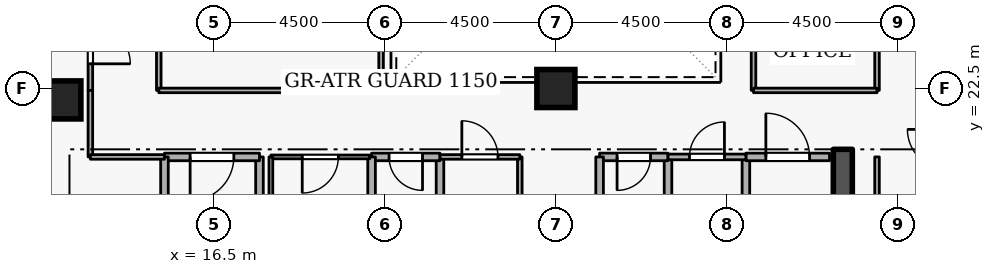
"""IFC4 building model, lengths in metres.
Left out: names, types, materials, properties, quantities, classifications, styles, units other than length and angle.
Written with IfcOpenShell. Run it as: python <this file> out.ifc"""

import sys

from ifc_helpers import new_model, si_unit, direction, frame, frame_2d, origin, origin_2d, place, context, subcontext, project, spatial, rectangle, extrude, element, fill, save


model = new_model("IFC4")
c1 = context("Model", 3, precision=1e-05, world=origin(), true_north=direction((0.0, 1.0)))
c2 = subcontext(c1, "Body", "Model", "MODEL_VIEW")
j1 = project(units=[si_unit("LENGTHUNIT", "METRE"), si_unit("PLANEANGLEUNIT", "RADIAN")], contexts=[c1])
p1 = place(None, origin())
s1 = spatial("IfcSite", under=j1, at=p1, CompositionType="ELEMENT")
p2 = place(p1, origin())
s2 = spatial("IfcBuilding", under=s1, at=p2, CompositionType="ELEMENT")
p3 = place(p2, frame((0.0, 0.0, 203.7)))
s3 = spatial("IfcBuildingStorey", under=s2, at=p3, CompositionType="ELEMENT", Elevation=203.7)
p4 = place(p3, frame((33.05, 15.1, 0.0), z_axis=(0.0, 0.0, 1.0), x_axis=(0.0, 1.0, 0.0)))
e1 = element("IfcWall", 1, at=p4, inside=s3, PredefinedType="SHEAR", context=c2, shape_type="SweptSolid", body=[
    extrude(rectangle(XDim=5.8, YDim=0.5, at=frame_2d((2.9, 0.0))), origin(), (0.0, 0.0, 1.0), 3.6),
])
for number, where, z_axis, x_axis in (
    (2, (12.5, 22.2, 0.0), (0.0, 0.0, 1.0), (1.0, 0.0, 0.0)),
    (3, (25.5, 22.5, 0.0), (0.0, 0.0, 1.0), (1.0, 0.0, 0.0)),
):
    element("IfcColumn", number, at=place(p3, frame(where, z_axis=z_axis, x_axis=x_axis)), inside=s3, PredefinedType="COLUMN", context=c2, shape_type="SweptSolid", body=[
        extrude(rectangle(XDim=1.0, YDim=1.0, at=origin_2d()), origin(), (0.0, 0.0, 1.0), 3.6),
    ])
p5 = place(p3, frame((17.7, 18.4, 0.0), z_axis=(0.0, 0.0, 1.0), x_axis=(0.0, 1.0, 0.0)))
e4 = element("IfcWall", 4, at=p5, inside=s3, PredefinedType="STANDARD", context=c2, shape_type="SweptSolid", body=[
    extrude(rectangle(XDim=2.3, YDim=0.2, at=frame_2d((1.15, 0.0))), origin(), (0.0, 0.0, 1.0), 2.545),
])
p6 = place(p3, frame((17.7, 20.7, 0.0), z_axis=(0.0, 0.0, 1.0), x_axis=(-1.0, 0.0, 0.0)))
e5 = element("IfcWall", 5, at=p6, inside=s3, PredefinedType="STANDARD", context=c2, shape_type="SweptSolid", body=[
    extrude(rectangle(XDim=2.5, YDim=0.2, at=frame_2d((1.25, 0.0))), origin(), (0.0, 0.0, 1.0), 3.34),
])
p7 = place(p6, frame((0.675, 0.0, 0.0)))
e6 = element("IfcOpeningElement", 6, at=p7, cuts=e5, PredefinedType="OPENING", context=c2, shape_type="SweptSolid", body=[
    extrude(rectangle(XDim=1.15, YDim=2.1, at=frame_2d((0.575, 1.05))), frame((0.0, 0.11, 0.0), z_axis=(0.0, -1.0, 0.0), x_axis=(1.0, 0.0, 0.0)), (0.0, 0.0, 1.0), 0.22),
])
p8 = place(p3, frame((15.2, 20.7, 0.0), z_axis=(0.0, 0.0, 1.0), x_axis=(0.0, -1.0, 0.0)))
e7 = element("IfcWall", 7, at=p8, inside=s3, PredefinedType="STANDARD", context=c2, shape_type="SweptSolid", body=[
    extrude(rectangle(XDim=5.7, YDim=0.2, at=frame_2d((2.85, 0.0))), origin(), (0.0, 0.0, 1.0), 3.34),
])
p9 = place(p3, frame((28.45, 18.65, 0.0), z_axis=(0.0, 0.0, 1.0), x_axis=(0.0, 1.0, 0.0)))
e8 = element("IfcWall", 8, at=p9, inside=s3, PredefinedType="STANDARD", context=c2, shape_type="SweptSolid", body=[
    extrude(rectangle(XDim=2.05, YDim=0.2, at=frame_2d((1.025, 0.0))), origin(), (0.0, 0.0, 1.0), 3.34),
])
p10 = place(p3, frame((28.45, 20.7, 0.0), z_axis=(0.0, 0.0, 1.0), x_axis=(-1.0, 0.0, 0.0)))
e9 = element("IfcWall", 9, at=p10, inside=s3, PredefinedType="STANDARD", context=c2, shape_type="SweptSolid", body=[
    extrude(rectangle(XDim=1.8, YDim=0.2, at=frame_2d((0.9, 0.0))), origin(), (0.0, 0.0, 1.0), 3.34),
])
p11 = place(p10, frame((0.46, 0.0, 0.0)))
e10 = element("IfcOpeningElement", 10, at=p11, cuts=e9, PredefinedType="OPENING", context=c2, shape_type="SweptSolid", body=[
    extrude(rectangle(XDim=0.88, YDim=2.04, at=frame_2d((0.44, 1.02))), frame((0.0, 0.11, 0.0), z_axis=(0.0, -1.0, 0.0), x_axis=(1.0, 0.0, 0.0)), (0.0, 0.0, 1.0), 0.22),
])
for number, where, z_axis, x_axis in (
    (11, (26.65, 20.7, 0.0), (0.0, 0.0, 1.0), (0.0, -1.0, 0.0)),
    (12, (22.45, 18.65, 0.0), (0.0, 0.0, 1.0), (0.0, 1.0, 0.0)),
):
    element("IfcWall", number, at=place(p3, frame(where, z_axis=z_axis, x_axis=x_axis)), inside=s3, PredefinedType="STANDARD", context=c2, shape_type="SweptSolid", body=[
        extrude(rectangle(XDim=2.05, YDim=0.2, at=frame_2d((1.025, 0.0))), origin(), (0.0, 0.0, 1.0), 3.34),
    ])
p12 = place(p3, frame((22.45, 20.7, 0.0), z_axis=(0.0, 0.0, 1.0), x_axis=(-1.0, 0.0, 0.0)))
e13 = element("IfcWall", 13, at=p12, inside=s3, PredefinedType="STANDARD", context=c2, shape_type="SweptSolid", body=[
    extrude(rectangle(XDim=1.8, YDim=0.2, at=frame_2d((0.9, 0.0))), origin(), (0.0, 0.0, 1.0), 3.34),
])
p13 = place(p12, frame((0.46, 0.0, 0.0)))
e14 = element("IfcOpeningElement", 14, at=p13, cuts=e13, PredefinedType="OPENING", context=c2, shape_type="SweptSolid", body=[
    extrude(rectangle(XDim=0.88, YDim=2.04, at=frame_2d((0.44, 1.02))), frame((0.0, 0.11, 0.0), z_axis=(0.0, -1.0, 0.0), x_axis=(1.0, 0.0, 0.0)), (0.0, 0.0, 1.0), 0.22),
])
for number, where, z_axis, x_axis in (
    (15, (20.65, 20.7, 0.0), (0.0, 0.0, 1.0), (0.0, -1.0, 0.0)),
    (16, (30.5, 18.65, 0.0), (0.0, 0.0, 1.0), (0.0, 1.0, 0.0)),
):
    element("IfcWall", number, at=place(p3, frame(where, z_axis=z_axis, x_axis=x_axis)), inside=s3, PredefinedType="STANDARD", context=c2, shape_type="SweptSolid", body=[
        extrude(rectangle(XDim=2.05, YDim=0.2, at=frame_2d((1.025, 0.0))), origin(), (0.0, 0.0, 1.0), 3.34),
    ])
p14 = place(p3, frame((30.5, 20.7, 0.0), z_axis=(0.0, 0.0, 1.0), x_axis=(1.0, 0.0, 0.0)))
e17 = element("IfcWall", 17, at=p14, inside=s3, PredefinedType="STANDARD", context=c2, shape_type="SweptSolid", body=[
    extrude(rectangle(XDim=2.2, YDim=0.2, at=frame_2d((1.1, 0.0))), origin(), (0.0, 0.0, 1.0), 3.34),
])
p15 = place(p14, frame((0.525, 0.0, 0.0)))
e18 = element("IfcOpeningElement", 18, at=p15, cuts=e17, PredefinedType="OPENING", context=c2, shape_type="SweptSolid", body=[
    extrude(rectangle(XDim=1.15, YDim=2.1, at=frame_2d((0.575, 1.05))), frame((0.0, 0.11, 0.0), z_axis=(0.0, -1.0, 0.0), x_axis=(1.0, 0.0, 0.0)), (0.0, 0.0, 1.0), 0.22),
])
p16 = place(p3, frame((20.6, 20.7, 0.0), z_axis=(0.0, 0.0, 1.0), x_axis=(-1.0, 0.0, 0.0)))
e19 = element("IfcWall", 19, at=p16, inside=s3, PredefinedType="PARTITIONING", context=c2, shape_type="SweptSolid", body=[
    extrude(rectangle(XDim=2.6, YDim=0.1, at=frame_2d((1.3, 0.0))), origin(), (0.0, 0.0, 1.0), 3.34),
])
p17 = place(p16, frame((0.825, 0.0, 0.0)))
e20 = element("IfcOpeningElement", 20, at=p17, cuts=e19, PredefinedType="OPENING", context=c2, shape_type="SweptSolid", body=[
    extrude(rectangle(XDim=0.95, YDim=2.1, at=frame_2d((0.475, 1.05))), frame((0.0, 0.06, 0.0), z_axis=(0.0, -1.0, 0.0), x_axis=(1.0, 0.0, 0.0)), (0.0, 0.0, 1.0), 0.12),
])
p18 = place(p3, frame((18.0, 20.7, 0.0), z_axis=(0.0, 0.0, 1.0), x_axis=(0.0, -1.0, 0.0)))
e21 = element("IfcWall", 21, at=p18, inside=s3, PredefinedType="PARTITIONING", context=c2, shape_type="SweptSolid", body=[
    extrude(rectangle(XDim=2.05, YDim=0.1, at=frame_2d((1.025, 0.0))), origin(), (0.0, 0.0, 1.0), 2.545),
])
p19 = place(p3, frame((24.55, 20.7, 0.0), z_axis=(0.0, 0.0, 1.0), x_axis=(0.0, -1.0, 0.0)))
e22 = element("IfcWall", 22, at=p19, inside=s3, PredefinedType="PARTITIONING", context=c2, shape_type="SweptSolid", body=[
    extrude(rectangle(XDim=2.05, YDim=0.12, at=frame_2d((1.025, 0.0))), origin(), (0.0, 0.0, 1.0), 3.34),
])
p20 = place(p3, frame((22.45, 20.7, 0.0), z_axis=(0.0, 0.0, 1.0), x_axis=(1.0, 0.0, 0.0)))
e23 = element("IfcWall", 23, at=p20, inside=s3, PredefinedType="PARTITIONING", context=c2, shape_type="SweptSolid", body=[
    extrude(rectangle(XDim=2.1, YDim=0.12, at=frame_2d((1.05, 0.0))), origin(), (0.0, 0.0, 1.0), 3.34),
])
p21 = place(p20, frame((0.575, 0.0, 0.0)))
e24 = element("IfcOpeningElement", 24, at=p21, cuts=e23, PredefinedType="OPENING", context=c2, shape_type="SweptSolid", body=[
    extrude(rectangle(XDim=0.95, YDim=2.1, at=frame_2d((0.475, 1.05))), frame((0.0, 0.07, 0.0), z_axis=(0.0, -1.0, 0.0), x_axis=(1.0, 0.0, 0.0)), (0.0, 0.0, 1.0), 0.14),
])
p22 = place(p3, frame((28.45, 20.7, 0.0), z_axis=(0.0, 0.0, 1.0), x_axis=(1.0, 0.0, 0.0)))
e25 = element("IfcWall", 25, at=p22, inside=s3, PredefinedType="PARTITIONING", context=c2, shape_type="SweptSolid", body=[
    extrude(rectangle(XDim=2.05, YDim=0.15, at=frame_2d((1.025, 0.0))), origin(), (0.0, 0.0, 1.0), 3.34),
])
p23 = place(p22, frame((0.565, 0.0, 0.0)))
e26 = element("IfcOpeningElement", 26, at=p23, cuts=e25, PredefinedType="OPENING", context=c2, shape_type="SweptSolid", body=[
    extrude(rectangle(XDim=0.92, YDim=2.08, at=frame_2d((0.46, 1.04))), frame((0.0, 0.085, 0.0), z_axis=(0.0, -1.0, 0.0), x_axis=(1.0, 0.0, 0.0)), (0.0, 0.0, 1.0), 0.17),
])
p24 = place(p3, frame((33.95, 20.7, 0.0), z_axis=(0.0, 0.0, 1.0), x_axis=(0.0, -1.0, 0.0)))
e27 = element("IfcWall", 27, at=p24, inside=s3, PredefinedType="PARTITIONING", context=c2, shape_type="SweptSolid", body=[
    extrude(rectangle(XDim=5.9, YDim=0.12, at=frame_2d((2.95, 0.0))), origin(), (0.0, 0.0, 1.0), 3.34),
])
p25 = place(p3, frame((13.25, 24.9, 0.0), z_axis=(0.0, 0.0, 1.0), x_axis=(0.0, -1.0, 0.0)))
e28 = element("IfcWall", 28, at=p25, inside=s3, PredefinedType="PARTITIONING", context=c2, shape_type="SweptSolid", body=[
    extrude(rectangle(XDim=2.45, YDim=0.12, at=frame_2d((1.225, 0.0))), origin(), (0.0, 0.0, 1.0), 3.34),
])
p26 = place(p25, frame((0.7, 0.0, 0.0)))
e29 = element("IfcOpeningElement", 29, at=p26, cuts=e28, PredefinedType="OPENING", context=c2, shape_type="SweptSolid", body=[
    extrude(rectangle(XDim=1.05, YDim=2.1, at=frame_2d((0.525, 1.05))), frame((0.0, 0.07, 0.0), z_axis=(0.0, -1.0, 0.0), x_axis=(1.0, 0.0, 0.0)), (0.0, 0.0, 1.0), 0.14),
])
p27 = place(p3, frame((13.25, 22.45, 0.0), z_axis=(0.0, 0.0, 1.0), x_axis=(0.0, -1.0, 0.0)))
e30 = element("IfcWall", 30, at=p27, inside=s3, PredefinedType="PARTITIONING", context=c2, shape_type="SweptSolid", body=[
    extrude(rectangle(XDim=1.75, YDim=0.12, at=frame_2d((0.875, 0.0))), origin(), (0.0, 0.0, 1.0), 3.34),
])
p28 = place(p3, frame((13.25, 20.7, 0.0), z_axis=(0.0, 0.0, 1.0), x_axis=(1.0, 0.0, 0.0)))
e31 = element("IfcWall", 31, at=p28, inside=s3, PredefinedType="PARTITIONING", context=c2, shape_type="SweptSolid", body=[
    extrude(rectangle(XDim=1.95, YDim=0.12, at=frame_2d((0.975, 0.0))), origin(), (0.0, 0.0, 1.0), 3.34),
])
p29 = place(p3, frame((15.05, 22.45, 0.0), z_axis=(0.0, 0.0, 1.0), x_axis=(0.0, 1.0, 0.0)))
e32 = element("IfcWall", 32, at=p29, inside=s3, PredefinedType="PARTITIONING", context=c2, shape_type="SweptSolid", body=[
    extrude(rectangle(XDim=9.1, YDim=0.12, at=frame_2d((4.55, 0.0))), origin(), (0.0, 0.0, 1.0), 3.34),
])
p30 = place(p29, frame((4.075, 0.0, 0.0)))
e33 = element("IfcOpeningElement", 33, at=p30, cuts=e32, PredefinedType="OPENING", context=c2, shape_type="SweptSolid", body=[
    extrude(rectangle(XDim=0.95, YDim=2.1, at=frame_2d((0.475, 1.05))), frame((0.0, 0.07, 0.0), z_axis=(0.0, -1.0, 0.0), x_axis=(1.0, 0.0, 0.0)), (0.0, 0.0, 1.0), 0.14),
])
p31 = place(p3, frame((20.9, 31.55, 0.0), z_axis=(0.0, 0.0, 1.0), x_axis=(0.0, -1.0, 0.0)))
e34 = element("IfcWall", 34, at=p31, inside=s3, PredefinedType="PARTITIONING", context=c2, shape_type="SweptSolid", body=[
    extrude(rectangle(XDim=9.1, YDim=0.12, at=frame_2d((4.55, 0.0))), origin(), (0.0, 0.0, 1.0), 3.34),
])
p32 = place(p3, frame((20.9, 22.45, 0.0), z_axis=(0.0, 0.0, 1.0), x_axis=(-1.0, 0.0, 0.0)))
e35 = element("IfcWall", 35, at=p32, inside=s3, PredefinedType="PARTITIONING", context=c2, shape_type="SweptSolid", body=[
    extrude(rectangle(XDim=5.85, YDim=0.12, at=frame_2d((2.925, 0.0))), origin(), (0.0, 0.0, 1.0), 3.34),
])
p33 = place(p3, frame((30.7, 22.45, 0.0), z_axis=(0.0, 0.0, 1.0), x_axis=(0.0, 1.0, 0.0)))
e36 = element("IfcWall", 36, at=p33, inside=s3, PredefinedType="PARTITIONING", context=c2, shape_type="SweptSolid", body=[
    extrude(rectangle(XDim=9.1, YDim=0.12, at=frame_2d((4.55, 0.0))), origin(), (0.0, 0.0, 1.0), 3.34),
])
p34 = place(p3, frame((33.95, 31.55, 0.0), z_axis=(0.0, 0.0, 1.0), x_axis=(0.0, -1.0, 0.0)))
e37 = element("IfcWall", 37, at=p34, inside=s3, PredefinedType="PARTITIONING", context=c2, shape_type="SweptSolid", body=[
    extrude(rectangle(XDim=9.1, YDim=0.12, at=frame_2d((4.55, 0.0))), origin(), (0.0, 0.0, 1.0), 3.34),
])
p35 = place(p34, frame((4.075, 0.0, 0.0)))
e38 = element("IfcOpeningElement", 38, at=p35, cuts=e37, PredefinedType="OPENING", context=c2, shape_type="SweptSolid", body=[
    extrude(rectangle(XDim=0.95, YDim=2.1, at=frame_2d((0.475, 1.05))), frame((0.0, 0.07, 0.0), z_axis=(0.0, -1.0, 0.0), x_axis=(1.0, 0.0, 0.0)), (0.0, 0.0, 1.0), 0.14),
])
p36 = place(p3, frame((33.95, 22.45, 0.0), z_axis=(0.0, 0.0, 1.0), x_axis=(-1.0, 0.0, 0.0)))
e39 = element("IfcWall", 39, at=p36, inside=s3, PredefinedType="PARTITIONING", context=c2, shape_type="SweptSolid", body=[
    extrude(rectangle(XDim=3.25, YDim=0.12, at=frame_2d((1.625, 0.0))), origin(), (0.0, 0.0, 1.0), 3.34),
])
p37 = place(p7, origin())
e40 = element("IfcDoor", 40, at=p37, inside=s3, OperationType="SINGLE_SWING_RIGHT", PredefinedType="DOOR", context=c2, shape_type="SweptSolid", body=[
    extrude(rectangle(XDim=1.15, YDim=2.1, at=frame_2d((0.575, 1.05))), frame((0.0, 0.025, 0.0), z_axis=(0.0, -1.0, 0.0), x_axis=(1.0, 0.0, 0.0)), (0.0, 0.0, 1.0), 0.05),
])
fill(e6, e40)
p38 = place(p11, origin())
e41 = element("IfcDoor", 41, at=p38, inside=s3, OperationType="SINGLE_SWING_RIGHT", PredefinedType="DOOR", context=c2, shape_type="SweptSolid", body=[
    extrude(rectangle(XDim=0.88, YDim=2.04, at=frame_2d((0.44, 1.02))), frame((0.0, 0.025, 0.0), z_axis=(0.0, -1.0, 0.0), x_axis=(1.0, 0.0, 0.0)), (0.0, 0.0, 1.0), 0.05),
])
fill(e10, e41)
p39 = place(p13, origin())
e42 = element("IfcDoor", 42, at=p39, inside=s3, OperationType="SINGLE_SWING_LEFT", PredefinedType="DOOR", context=c2, shape_type="SweptSolid", body=[
    extrude(rectangle(XDim=0.88, YDim=2.04, at=frame_2d((0.44, 1.02))), frame((0.0, 0.025, 0.0), z_axis=(0.0, -1.0, 0.0), x_axis=(1.0, 0.0, 0.0)), (0.0, 0.0, 1.0), 0.05),
])
fill(e14, e42)
p40 = place(p17, origin())
e43 = element("IfcDoor", 43, at=p40, inside=s3, OperationType="SINGLE_SWING_RIGHT", PredefinedType="DOOR", context=c2, shape_type="SweptSolid", body=[
    extrude(rectangle(XDim=0.95, YDim=2.1, at=frame_2d((0.475, 1.05))), frame((0.0, 0.025, 0.0), z_axis=(0.0, -1.0, 0.0), x_axis=(1.0, 0.0, 0.0)), (0.0, 0.0, 1.0), 0.05),
])
fill(e20, e43)
p41 = place(p21, origin())
e44 = element("IfcDoor", 44, at=p41, inside=s3, OperationType="SINGLE_SWING_LEFT", PredefinedType="DOOR", context=c2, shape_type="SweptSolid", body=[
    extrude(rectangle(XDim=0.95, YDim=2.1, at=frame_2d((0.475, 1.05))), frame((0.0, 0.025, 0.0), z_axis=(0.0, -1.0, 0.0), x_axis=(1.0, 0.0, 0.0)), (0.0, 0.0, 1.0), 0.05),
])
fill(e24, e44)
p42 = place(p23, origin())
e45 = element("IfcDoor", 45, at=p42, inside=s3, OperationType="SINGLE_SWING_RIGHT", PredefinedType="DOOR", context=c2, shape_type="SweptSolid", body=[
    extrude(rectangle(XDim=0.92, YDim=2.08, at=frame_2d((0.46, 1.04))), frame((0.0, 0.025, 0.0), z_axis=(0.0, -1.0, 0.0), x_axis=(1.0, 0.0, 0.0)), (0.0, 0.0, 1.0), 0.05),
])
fill(e26, e45)
p43 = place(p15, origin())
e46 = element("IfcDoor", 46, at=p43, inside=s3, OperationType="SINGLE_SWING_LEFT", PredefinedType="DOOR", context=c2, shape_type="SweptSolid", body=[
    extrude(rectangle(XDim=1.15, YDim=2.1, at=frame_2d((0.575, 1.05))), frame((0.0, 0.025, 0.0), z_axis=(0.0, -1.0, 0.0), x_axis=(1.0, 0.0, 0.0)), (0.0, 0.0, 1.0), 0.05),
])
fill(e18, e46)
p44 = place(p26, origin())
e47 = element("IfcDoor", 47, at=p44, inside=s3, OperationType="SINGLE_SWING_RIGHT", PredefinedType="DOOR", context=c2, shape_type="SweptSolid", body=[
    extrude(rectangle(XDim=1.05, YDim=2.1, at=frame_2d((0.525, 1.05))), frame((0.0, 0.025, 0.0), z_axis=(0.0, -1.0, 0.0), x_axis=(1.0, 0.0, 0.0)), (0.0, 0.0, 1.0), 0.05),
])
fill(e29, e47)
save(model, sys.argv[1])
